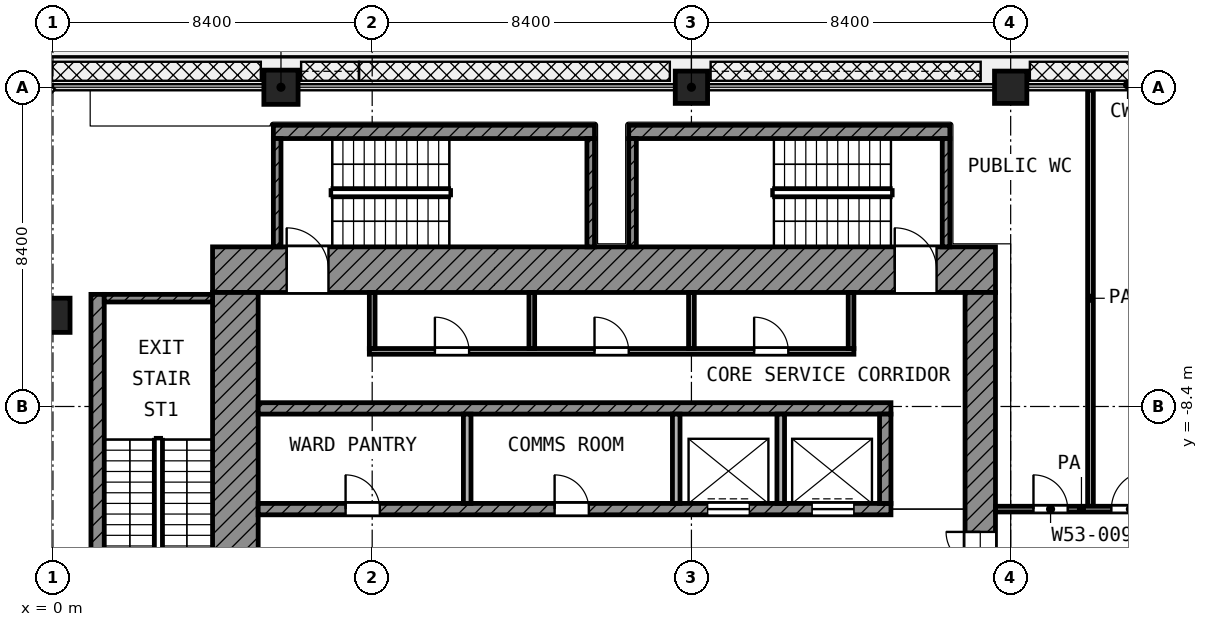
"""IFC4 building model, lengths in metres.
Left out: names, types, materials, properties, quantities, classifications, styles, units other than length and angle.
Written with IfcOpenShell. Run it as: python <this file> out.ifc"""

import sys

from ifc_helpers import new_model, si_unit, direction, frame, frame_2d, origin, origin_2d, place, context, subcontext, project, spatial, rectangle, extrude, element, fill, save


model = new_model("IFC4")
c1 = context("Model", 3, precision=1e-05, world=origin(), true_north=direction((0.0, 1.0)))
c2 = subcontext(c1, "Body", "Model", "MODEL_VIEW")
j1 = project(units=[si_unit("LENGTHUNIT", "METRE"), si_unit("PLANEANGLEUNIT", "RADIAN")], contexts=[c1])
p1 = place(None, origin())
s1 = spatial("IfcSite", under=j1, at=p1, CompositionType="ELEMENT")
p2 = place(p1, origin())
s2 = spatial("IfcBuilding", under=s1, at=p2, CompositionType="ELEMENT")
p3 = place(p2, frame((0.0, 0.0, 251.6)))
s3 = spatial("IfcBuildingStorey", under=s2, at=p3, CompositionType="ELEMENT", Elevation=251.6)
p4 = place(p3, frame((6.0, 0.0, 0.0), z_axis=(0.0, 0.0, 1.0), x_axis=(1.0, 0.0, 0.0)))
e1 = element("IfcColumn", 1, at=p4, inside=s3, PredefinedType="COLUMN", context=c2, shape_type="SweptSolid", body=[
    extrude(rectangle(XDim=0.9, YDim=0.9, at=origin_2d()), origin(), (0.0, 0.0, 1.0), 4.2),
])
for number, where, z_axis, x_axis in (
    (2, (16.8, 0.0, 0.0), (0.0, 0.0, 1.0), (1.0, 0.0, 0.0)),
    (3, (25.2, 0.0, 0.0), (0.0, 0.0, 1.0), (1.0, 0.0, 0.0)),
):
    element("IfcColumn", number, at=place(p3, frame(where, z_axis=z_axis, x_axis=x_axis)), inside=s3, PredefinedType="COLUMN", context=c2, shape_type="SweptSolid", body=[
        extrude(rectangle(XDim=0.85, YDim=0.85, at=origin_2d()), origin(), (0.0, 0.0, 1.0), 4.2),
    ])
p5 = place(p3, frame((0.0, -6.0, 0.0), z_axis=(0.0, 0.0, 1.0), x_axis=(1.0, 0.0, 0.0)))
e4 = element("IfcColumn", 4, at=p5, inside=s3, PredefinedType="COLUMN", context=c2, shape_type="SweptSolid", body=[
    extrude(rectangle(XDim=0.9, YDim=0.9, at=origin_2d()), origin(), (0.0, 0.0, 1.0), 4.2),
])
p6 = place(p3, frame((4.2, -4.8, 0.0), z_axis=(0.0, 0.0, 1.0), x_axis=(1.0, 0.0, 0.0)))
e5 = element("IfcWall", 5, at=p6, inside=s3, PredefinedType="SHEAR", context=c2, shape_type="SweptSolid", body=[
    extrude(rectangle(XDim=20.6, YDim=1.2, at=frame_2d((10.3, 0.0))), origin(), (0.0, 0.0, 1.0), 3.6),
])
p7 = place(p6, frame((1.95, 0.0, 0.0)))
e6 = element("IfcOpeningElement", 6, at=p7, cuts=e5, PredefinedType="OPENING", context=c2, shape_type="SweptSolid", body=[
    extrude(rectangle(XDim=1.1, YDim=2.1, at=frame_2d((0.55, 1.05))), frame((0.0, 0.61, 0.0), z_axis=(0.0, -1.0, 0.0), x_axis=(1.0, 0.0, 0.0)), (0.0, 0.0, 1.0), 1.22),
])
p8 = place(p6, frame((17.95, 0.0, 0.0)))
e7 = element("IfcOpeningElement", 7, at=p8, cuts=e5, PredefinedType="OPENING", context=c2, shape_type="SweptSolid", body=[
    extrude(rectangle(XDim=1.1, YDim=2.1, at=frame_2d((0.55, 1.05))), frame((0.0, 0.61, 0.0), z_axis=(0.0, -1.0, 0.0), x_axis=(1.0, 0.0, 0.0)), (0.0, 0.0, 1.0), 1.22),
])
p9 = place(p3, frame((4.8, -24.8, 0.0), z_axis=(0.0, 0.0, 1.0), x_axis=(0.0, 1.0, 0.0)))
e8 = element("IfcWall", 8, at=p9, inside=s3, PredefinedType="SHEAR", context=c2, shape_type="SweptSolid", body=[
    extrude(rectangle(XDim=19.4, YDim=1.2, at=frame_2d((9.7, 0.0))), origin(), (0.0, 0.0, 1.0), 3.6),
])
p10 = place(p9, frame((11.25, 0.0, 0.0)))
e9 = element("IfcOpeningElement", 9, at=p10, cuts=e8, PredefinedType="OPENING", context=c2, shape_type="SweptSolid", body=[
    extrude(rectangle(XDim=1.1, YDim=2.1, at=frame_2d((0.55, 1.05))), frame((0.0, 0.61, 0.0), z_axis=(0.0, -1.0, 0.0), x_axis=(1.0, 0.0, 0.0)), (0.0, 0.0, 1.0), 1.22),
])
p11 = place(p9, frame((1.95, 0.0, 0.0)))
e10 = element("IfcOpeningElement", 10, at=p11, cuts=e8, PredefinedType="OPENING", context=c2, shape_type="SweptSolid", body=[
    extrude(rectangle(XDim=1.1, YDim=2.1, at=frame_2d((0.55, 1.05))), frame((0.0, 0.61, 0.0), z_axis=(0.0, -1.0, 0.0), x_axis=(1.0, 0.0, 0.0)), (0.0, 0.0, 1.0), 1.22),
])
p12 = place(p3, frame((24.4, -24.0, 0.0), z_axis=(0.0, 0.0, 1.0), x_axis=(0.0, 1.0, 0.0)))
e11 = element("IfcWall", 11, at=p12, inside=s3, PredefinedType="SHEAR", context=c2, shape_type="SweptSolid", body=[
    extrude(rectangle(XDim=18.6, YDim=0.8, at=frame_2d((9.3, 0.0))), origin(), (0.0, 0.0, 1.0), 3.6),
])
p13 = place(p12, frame((10.5, 0.0, 0.0)))
e12 = element("IfcOpeningElement", 12, at=p13, cuts=e11, PredefinedType="OPENING", context=c2, shape_type="SweptSolid", body=[
    extrude(rectangle(XDim=1.8, YDim=2.1, at=frame_2d((0.9, 1.05))), frame((0.0, 0.41, 0.0), z_axis=(0.0, -1.0, 0.0), x_axis=(1.0, 0.0, 0.0)), (0.0, 0.0, 1.0), 0.82),
])
p14 = place(p3, frame((5.4, -8.45, 0.0), z_axis=(0.0, 0.0, 1.0), x_axis=(1.0, 0.0, 0.0)))
e13 = element("IfcWall", 13, at=p14, inside=s3, PredefinedType="SHEAR", context=c2, shape_type="SweptSolid", body=[
    extrude(rectangle(XDim=16.65, YDim=0.3, at=frame_2d((8.325, 0.0))), origin(), (0.0, 0.0, 1.0), 3.6),
])
p15 = place(p3, frame((5.4, -11.1, 0.0), z_axis=(0.0, 0.0, 1.0), x_axis=(1.0, 0.0, 0.0)))
e14 = element("IfcWall", 14, at=p15, inside=s3, PredefinedType="SHEAR", context=c2, shape_type="SweptSolid", body=[
    extrude(rectangle(XDim=16.65, YDim=0.3, at=frame_2d((8.325, 0.0))), origin(), (0.0, 0.0, 1.0), 3.6),
])
p16 = place(p15, frame((11.825, 0.0, 0.0)))
e15 = element("IfcOpeningElement", 15, at=p16, cuts=e14, PredefinedType="OPENING", context=c2, shape_type="SweptSolid", body=[
    extrude(rectangle(XDim=1.1, YDim=2.1, at=frame_2d((0.55, 1.05))), frame((0.0, 0.16, 0.0), z_axis=(0.0, -1.0, 0.0), x_axis=(1.0, 0.0, 0.0)), (0.0, 0.0, 1.0), 0.32),
])
p17 = place(p15, frame((14.575, 0.0, 0.0)))
e16 = element("IfcOpeningElement", 16, at=p17, cuts=e14, PredefinedType="OPENING", context=c2, shape_type="SweptSolid", body=[
    extrude(rectangle(XDim=1.1, YDim=2.1, at=frame_2d((0.55, 1.05))), frame((0.0, 0.16, 0.0), z_axis=(0.0, -1.0, 0.0), x_axis=(1.0, 0.0, 0.0)), (0.0, 0.0, 1.0), 0.32),
])
p18 = place(p15, frame((2.3, 0.0, 0.0)))
e17 = element("IfcOpeningElement", 17, at=p18, cuts=e14, PredefinedType="OPENING", context=c2, shape_type="SweptSolid", body=[
    extrude(rectangle(XDim=0.9, YDim=2.1, at=frame_2d((0.45, 1.05))), frame((0.0, 0.16, 0.0), z_axis=(0.0, -1.0, 0.0), x_axis=(1.0, 0.0, 0.0)), (0.0, 0.0, 1.0), 0.32),
])
p19 = place(p15, frame((7.8, 0.0, 0.0)))
e18 = element("IfcOpeningElement", 18, at=p19, cuts=e14, PredefinedType="OPENING", context=c2, shape_type="SweptSolid", body=[
    extrude(rectangle(XDim=0.9, YDim=2.1, at=frame_2d((0.45, 1.05))), frame((0.0, 0.16, 0.0), z_axis=(0.0, -1.0, 0.0), x_axis=(1.0, 0.0, 0.0)), (0.0, 0.0, 1.0), 0.32),
])
p20 = place(p3, frame((21.9, -10.95, 0.0), z_axis=(0.0, 0.0, 1.0), x_axis=(0.0, 1.0, 0.0)))
e19 = element("IfcWall", 19, at=p20, inside=s3, PredefinedType="SHEAR", context=c2, shape_type="SweptSolid", body=[
    extrude(rectangle(XDim=2.35, YDim=0.3, at=frame_2d((1.175, 0.0))), origin(), (0.0, 0.0, 1.0), 3.6),
])
for number, where, z_axis, x_axis in (
    (20, (10.9, -10.95, 0.0), (0.0, 0.0, 1.0), (0.0, 1.0, 0.0)),
    (21, (16.4, -10.95, 0.0), (0.0, 0.0, 1.0), (0.0, 1.0, 0.0)),
    (22, (19.15, -10.95, 0.0), (0.0, 0.0, 1.0), (0.0, 1.0, 0.0)),
):
    element("IfcWall", number, at=place(p3, frame(where, z_axis=z_axis, x_axis=x_axis)), inside=s3, PredefinedType="PARTITIONING", context=c2, shape_type="SweptSolid", body=[
        extrude(rectangle(XDim=2.35, YDim=0.2, at=frame_2d((1.175, 0.0))), origin(), (0.0, 0.0, 1.0), 3.6),
    ])
p21 = place(p3, frame((8.325, -6.95, 0.0), z_axis=(0.0, 0.0, 1.0), x_axis=(1.0, 0.0, 0.0)))
e23 = element("IfcWall", 23, at=p21, inside=s3, PredefinedType="PARTITIONING", context=c2, shape_type="SweptSolid", body=[
    extrude(rectangle(XDim=12.75, YDim=0.15, at=frame_2d((6.375, 0.0))), origin(), (0.0, 0.0, 1.0), 3.6),
])
p22 = place(p21, frame((1.725, 0.0, 0.0)))
e24 = element("IfcOpeningElement", 24, at=p22, cuts=e23, PredefinedType="OPENING", context=c2, shape_type="SweptSolid", body=[
    extrude(rectangle(XDim=0.9, YDim=2.1, at=frame_2d((0.45, 1.05))), frame((0.0, 0.085, 0.0), z_axis=(0.0, -1.0, 0.0), x_axis=(1.0, 0.0, 0.0)), (0.0, 0.0, 1.0), 0.17),
])
p23 = place(p21, frame((5.925, 0.0, 0.0)))
e25 = element("IfcOpeningElement", 25, at=p23, cuts=e23, PredefinedType="OPENING", context=c2, shape_type="SweptSolid", body=[
    extrude(rectangle(XDim=0.9, YDim=2.1, at=frame_2d((0.45, 1.05))), frame((0.0, 0.085, 0.0), z_axis=(0.0, -1.0, 0.0), x_axis=(1.0, 0.0, 0.0)), (0.0, 0.0, 1.0), 0.17),
])
p24 = place(p21, frame((10.125, 0.0, 0.0)))
e26 = element("IfcOpeningElement", 26, at=p24, cuts=e23, PredefinedType="OPENING", context=c2, shape_type="SweptSolid", body=[
    extrude(rectangle(XDim=0.9, YDim=2.1, at=frame_2d((0.45, 1.05))), frame((0.0, 0.085, 0.0), z_axis=(0.0, -1.0, 0.0), x_axis=(1.0, 0.0, 0.0)), (0.0, 0.0, 1.0), 0.17),
])
for number, where, z_axis, x_axis in (
    (27, (8.4, -6.875, 0.0), (0.0, 0.0, 1.0), (0.0, 1.0, 0.0)),
    (28, (12.6, -6.875, 0.0), (0.0, 0.0, 1.0), (0.0, 1.0, 0.0)),
    (29, (16.8, -6.875, 0.0), (0.0, 0.0, 1.0), (0.0, 1.0, 0.0)),
    (30, (21.0, -6.875, 0.0), (0.0, 0.0, 1.0), (0.0, 1.0, 0.0)),
):
    element("IfcWall", number, at=place(p3, frame(where, z_axis=z_axis, x_axis=x_axis)), inside=s3, PredefinedType="PARTITIONING", context=c2, shape_type="SweptSolid", body=[
        extrude(rectangle(XDim=1.475, YDim=0.15, at=frame_2d((0.738, 0.0))), origin(), (0.0, 0.0, 1.0), 3.6),
    ])
p25 = place(p3, frame((1.175, -13.9, 0.0), z_axis=(0.0, 0.0, 1.0), x_axis=(0.0, 1.0, 0.0)))
e31 = element("IfcWall", 31, at=p25, inside=s3, PredefinedType="SHEAR", context=c2, shape_type="SweptSolid", body=[
    extrude(rectangle(XDim=8.45, YDim=0.35, at=frame_2d((4.225, 0.0))), origin(), (0.0, 0.0, 1.0), 3.6),
])
p26 = place(p3, frame((1.35, -5.55, 0.0), z_axis=(0.0, 0.0, 1.0), x_axis=(1.0, 0.0, 0.0)))
e32 = element("IfcWall", 32, at=p26, inside=s3, PredefinedType="SHEAR", context=c2, shape_type="SweptSolid", body=[
    extrude(rectangle(XDim=2.85, YDim=0.2, at=frame_2d((1.425, 0.0))), origin(), (0.0, 0.0, 1.0), 3.6),
])
p27 = place(p3, frame((5.8, -1.175, 0.0), z_axis=(0.0, 0.0, 1.0), x_axis=(1.0, 0.0, 0.0)))
e33 = element("IfcWall", 33, at=p27, inside=s3, PredefinedType="SHEAR", context=c2, shape_type="SweptSolid", body=[
    extrude(rectangle(XDim=8.45, YDim=0.35, at=frame_2d((4.225, 0.0))), origin(), (0.0, 0.0, 1.0), 3.6),
])
for number, where, z_axis, x_axis in (
    (34, (5.9, -4.2, 0.0), (0.0, 0.0, 1.0), (0.0, 1.0, 0.0)),
    (35, (14.15, -4.2, 0.0), (0.0, 0.0, 1.0), (0.0, 1.0, 0.0)),
):
    element("IfcWall", number, at=place(p3, frame(where, z_axis=z_axis, x_axis=x_axis)), inside=s3, PredefinedType="SHEAR", context=c2, shape_type="SweptSolid", body=[
        extrude(rectangle(XDim=2.85, YDim=0.2, at=frame_2d((1.425, 0.0))), origin(), (0.0, 0.0, 1.0), 3.6),
    ])
p28 = place(p3, frame((15.15, -1.175, 0.0), z_axis=(0.0, 0.0, 1.0), x_axis=(1.0, 0.0, 0.0)))
e36 = element("IfcWall", 36, at=p28, inside=s3, PredefinedType="SHEAR", context=c2, shape_type="SweptSolid", body=[
    extrude(rectangle(XDim=8.45, YDim=0.35, at=frame_2d((4.225, 0.0))), origin(), (0.0, 0.0, 1.0), 3.6),
])
for number, where, z_axis, x_axis in (
    (37, (15.25, -4.2, 0.0), (0.0, 0.0, 1.0), (0.0, 1.0, 0.0)),
    (38, (23.5, -4.2, 0.0), (0.0, 0.0, 1.0), (0.0, 1.0, 0.0)),
):
    element("IfcWall", number, at=place(p3, frame(where, z_axis=z_axis, x_axis=x_axis)), inside=s3, PredefinedType="SHEAR", context=c2, shape_type="SweptSolid", body=[
        extrude(rectangle(XDim=2.85, YDim=0.2, at=frame_2d((1.425, 0.0))), origin(), (0.0, 0.0, 1.0), 3.6),
    ])
p29 = place(p3, frame((24.8, -11.1, 0.0), z_axis=(0.0, 0.0, 1.0), x_axis=(1.0, 0.0, 0.0)))
e39 = element("IfcWall", 39, at=p29, inside=s3, PredefinedType="PARTITIONING", context=c2, shape_type="SweptSolid", body=[
    extrude(rectangle(XDim=4.525, YDim=0.15, at=frame_2d((2.262, 0.0))), origin(), (0.0, 0.0, 1.0), 3.6),
])
p30 = place(p29, frame((1.0, 0.0, 0.0)))
e40 = element("IfcOpeningElement", 40, at=p30, cuts=e39, PredefinedType="OPENING", context=c2, shape_type="SweptSolid", body=[
    extrude(rectangle(XDim=0.9, YDim=2.1, at=frame_2d((0.45, 1.05))), frame((0.0, 0.085, 0.0), z_axis=(0.0, -1.0, 0.0), x_axis=(1.0, 0.0, 0.0)), (0.0, 0.0, 1.0), 0.17),
])
p31 = place(p29, frame((3.05, 0.0, 0.0)))
e41 = element("IfcOpeningElement", 41, at=p31, cuts=e39, PredefinedType="OPENING", context=c2, shape_type="SweptSolid", body=[
    extrude(rectangle(XDim=1.0, YDim=2.1, at=frame_2d((0.5, 1.05))), frame((0.0, 0.085, 0.0), z_axis=(0.0, -1.0, 0.0), x_axis=(1.0, 0.0, 0.0)), (0.0, 0.0, 1.0), 0.17),
])
p32 = place(p3, frame((27.3, -11.025, 0.0), z_axis=(0.0, 0.0, 1.0), x_axis=(0.0, 1.0, 0.0)))
e42 = element("IfcWall", 42, at=p32, inside=s3, PredefinedType="PARTITIONING", context=c2, shape_type="SweptSolid", body=[
    extrude(rectangle(XDim=10.945, YDim=0.15, at=frame_2d((5.472, 0.0))), origin(), (0.0, 0.0, 1.0), 3.6),
])
p33 = place(p16, origin())
e43 = element("IfcDoor", 43, at=p33, inside=s3, OperationType="DOUBLE_DOOR_SLIDING", PredefinedType="DOOR", context=c2, shape_type="SweptSolid", body=[
    extrude(rectangle(XDim=1.1, YDim=2.1, at=frame_2d((0.55, 1.05))), frame((0.0, 0.025, 0.0), z_axis=(0.0, -1.0, 0.0), x_axis=(1.0, 0.0, 0.0)), (0.0, 0.0, 1.0), 0.05),
])
fill(e15, e43)
p34 = place(p17, origin())
e44 = element("IfcDoor", 44, at=p34, inside=s3, OperationType="DOUBLE_DOOR_SLIDING", PredefinedType="DOOR", context=c2, shape_type="SweptSolid", body=[
    extrude(rectangle(XDim=1.1, YDim=2.1, at=frame_2d((0.55, 1.05))), frame((0.0, 0.025, 0.0), z_axis=(0.0, -1.0, 0.0), x_axis=(1.0, 0.0, 0.0)), (0.0, 0.0, 1.0), 0.05),
])
fill(e16, e44)
p35 = place(p7, origin())
e45 = element("IfcDoor", 45, at=p35, inside=s3, OperationType="SINGLE_SWING_LEFT", PredefinedType="DOOR", context=c2, shape_type="SweptSolid", body=[
    extrude(rectangle(XDim=1.1, YDim=2.1, at=frame_2d((0.55, 1.05))), frame((0.0, 0.025, 0.0), z_axis=(0.0, -1.0, 0.0), x_axis=(1.0, 0.0, 0.0)), (0.0, 0.0, 1.0), 0.05),
])
fill(e6, e45)
p36 = place(p8, origin())
e46 = element("IfcDoor", 46, at=p36, inside=s3, OperationType="SINGLE_SWING_LEFT", PredefinedType="DOOR", context=c2, shape_type="SweptSolid", body=[
    extrude(rectangle(XDim=1.1, YDim=2.1, at=frame_2d((0.55, 1.05))), frame((0.0, 0.025, 0.0), z_axis=(0.0, -1.0, 0.0), x_axis=(1.0, 0.0, 0.0)), (0.0, 0.0, 1.0), 0.05),
])
fill(e7, e46)
p37 = place(p13, origin())
e47 = element("IfcDoor", 47, at=p37, inside=s3, OperationType="DOUBLE_DOOR_SINGLE_SWING", PredefinedType="DOOR", context=c2, shape_type="SweptSolid", body=[
    extrude(rectangle(XDim=1.8, YDim=2.1, at=frame_2d((0.9, 1.05))), frame((0.0, 0.025, 0.0), z_axis=(0.0, -1.0, 0.0), x_axis=(1.0, 0.0, 0.0)), (0.0, 0.0, 1.0), 0.05),
])
fill(e12, e47)
p38 = place(p22, origin())
e48 = element("IfcDoor", 48, at=p38, inside=s3, OperationType="SINGLE_SWING_LEFT", PredefinedType="DOOR", context=c2, shape_type="SweptSolid", body=[
    extrude(rectangle(XDim=0.9, YDim=2.1, at=frame_2d((0.45, 1.05))), frame((0.0, 0.025, 0.0), z_axis=(0.0, -1.0, 0.0), x_axis=(1.0, 0.0, 0.0)), (0.0, 0.0, 1.0), 0.05),
])
fill(e24, e48)
p39 = place(p23, origin())
e49 = element("IfcDoor", 49, at=p39, inside=s3, OperationType="SINGLE_SWING_LEFT", PredefinedType="DOOR", context=c2, shape_type="SweptSolid", body=[
    extrude(rectangle(XDim=0.9, YDim=2.1, at=frame_2d((0.45, 1.05))), frame((0.0, 0.025, 0.0), z_axis=(0.0, -1.0, 0.0), x_axis=(1.0, 0.0, 0.0)), (0.0, 0.0, 1.0), 0.05),
])
fill(e25, e49)
p40 = place(p24, origin())
e50 = element("IfcDoor", 50, at=p40, inside=s3, OperationType="SINGLE_SWING_LEFT", PredefinedType="DOOR", context=c2, shape_type="SweptSolid", body=[
    extrude(rectangle(XDim=0.9, YDim=2.1, at=frame_2d((0.45, 1.05))), frame((0.0, 0.025, 0.0), z_axis=(0.0, -1.0, 0.0), x_axis=(1.0, 0.0, 0.0)), (0.0, 0.0, 1.0), 0.05),
])
fill(e26, e50)
p41 = place(p18, origin())
e51 = element("IfcDoor", 51, at=p41, inside=s3, OperationType="SINGLE_SWING_LEFT", PredefinedType="DOOR", context=c2, shape_type="SweptSolid", body=[
    extrude(rectangle(XDim=0.9, YDim=2.1, at=frame_2d((0.45, 1.05))), frame((0.0, 0.025, 0.0), z_axis=(0.0, -1.0, 0.0), x_axis=(1.0, 0.0, 0.0)), (0.0, 0.0, 1.0), 0.05),
])
fill(e17, e51)
p42 = place(p19, origin())
e52 = element("IfcDoor", 52, at=p42, inside=s3, OperationType="SINGLE_SWING_LEFT", PredefinedType="DOOR", context=c2, shape_type="SweptSolid", body=[
    extrude(rectangle(XDim=0.9, YDim=2.1, at=frame_2d((0.45, 1.05))), frame((0.0, 0.025, 0.0), z_axis=(0.0, -1.0, 0.0), x_axis=(1.0, 0.0, 0.0)), (0.0, 0.0, 1.0), 0.05),
])
fill(e18, e52)
p43 = place(p30, origin())
e53 = element("IfcDoor", 53, at=p43, inside=s3, OperationType="SINGLE_SWING_LEFT", PredefinedType="DOOR", context=c2, shape_type="SweptSolid", body=[
    extrude(rectangle(XDim=0.9, YDim=2.1, at=frame_2d((0.45, 1.05))), frame((0.0, 0.025, 0.0), z_axis=(0.0, -1.0, 0.0), x_axis=(1.0, 0.0, 0.0)), (0.0, 0.0, 1.0), 0.05),
])
fill(e40, e53)
p44 = place(p31, origin())
e54 = element("IfcDoor", 54, at=p44, inside=s3, OperationType="SINGLE_SWING_RIGHT", PredefinedType="DOOR", context=c2, shape_type="SweptSolid", body=[
    extrude(rectangle(XDim=1.0, YDim=2.1, at=frame_2d((0.5, 1.05))), frame((0.0, 0.025, 0.0), z_axis=(0.0, -1.0, 0.0), x_axis=(1.0, 0.0, 0.0)), (0.0, 0.0, 1.0), 0.05),
])
fill(e41, e54)
save(model, sys.argv[1])
